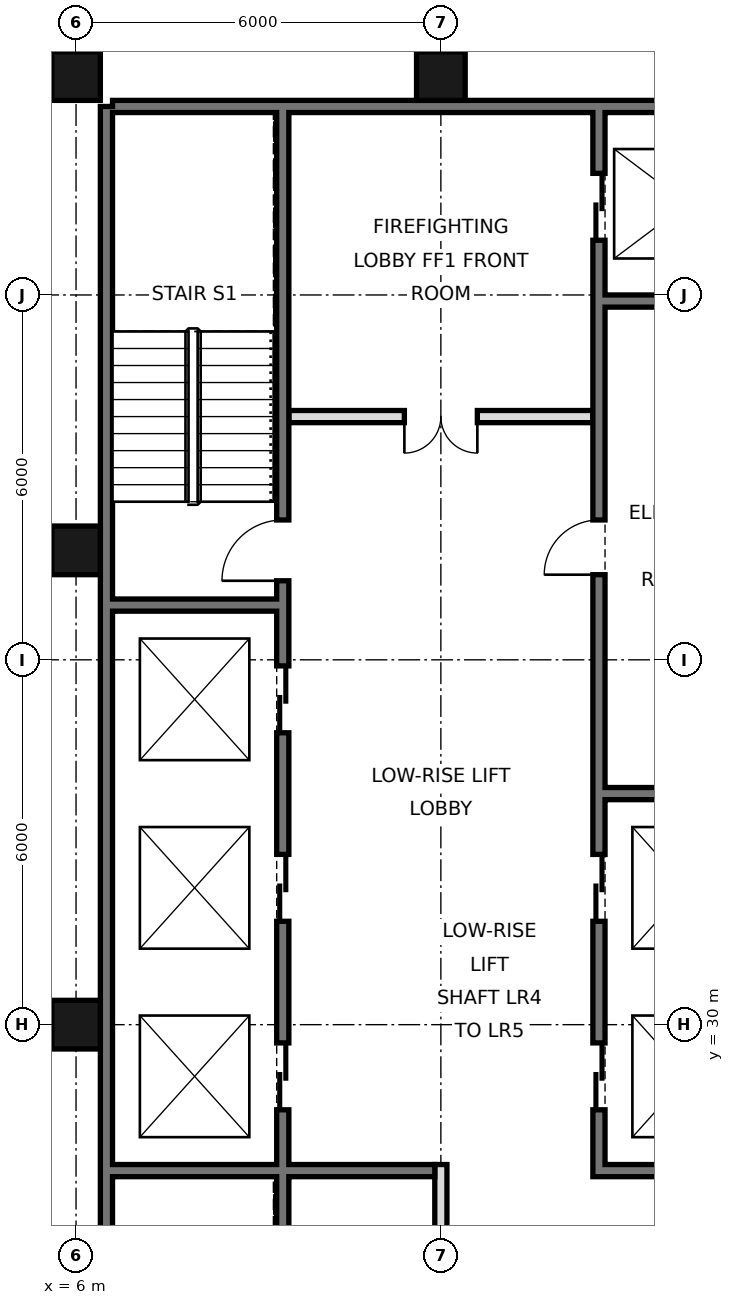
"""IFC4 building model, lengths in metres.
Left out: names, types, materials, properties, quantities, classifications, styles, units other than length and angle.
Written with IfcOpenShell. Run it as: python <this file> out.ifc"""

import sys

from ifc_helpers import new_model, si_unit, direction, frame, frame_2d, origin, origin_2d, place, context, subcontext, project, spatial, rectangle, hollow_rectangle, extrude, element, fill, save


model = new_model("IFC4")
c1 = context("Model", 3, precision=1e-05, world=origin(), true_north=direction((0.0, 1.0)))
c2 = subcontext(c1, "Body", "Model", "MODEL_VIEW")
j1 = project(units=[si_unit("LENGTHUNIT", "METRE"), si_unit("PLANEANGLEUNIT", "RADIAN")], contexts=[c1])
p1 = place(None, origin())
s1 = spatial("IfcSite", under=j1, at=p1, CompositionType="ELEMENT")
p2 = place(p1, origin())
s2 = spatial("IfcBuilding", under=s1, at=p2, CompositionType="ELEMENT")
p3 = place(p2, frame((0.0, 0.0, 67.8)))
s3 = spatial("IfcBuildingStorey", under=s2, at=p3, CompositionType="ELEMENT", Elevation=67.8)
for number, where, z_axis, x_axis in (
    (1, (6.0, 30.0, 0.0), (0.0, 0.0, 1.0), (1.0, 0.0, 0.0)),
    (2, (6.0, 37.8, 0.0), (0.0, 0.0, 1.0), (1.0, 0.0, 0.0)),
    (3, (6.0, 45.6, 0.0), (0.0, 0.0, 1.0), (1.0, 0.0, 0.0)),
    (4, (12.0, 45.6, 0.0), (0.0, 0.0, 1.0), (1.0, 0.0, 0.0)),
):
    element("IfcColumn", number, at=place(p3, frame(where, z_axis=z_axis, x_axis=x_axis)), inside=s3, PredefinedType="COLUMN", context=c2, shape_type="SweptSolid", body=[
        extrude(hollow_rectangle(XDim=0.8, YDim=0.8, WallThickness=0.06, at=origin_2d()), origin(), (0.0, 0.0, 1.0), 3.6),
    ])
p4 = place(p3, frame((6.5, 21.6, 0.0), z_axis=(0.0, 0.0, 1.0), x_axis=(0.0, 1.0, 0.0)))
e5 = element("IfcWall", 5, at=p4, inside=s3, PredefinedType="SOLIDWALL", context=c2, shape_type="SweptSolid", body=[
    extrude(rectangle(XDim=23.5, YDim=0.2, at=frame_2d((11.75, 0.0))), origin(), (0.0, 0.0, 1.0), 3.42),
])
p5 = place(p3, frame((6.6, 45.1, 0.0), z_axis=(0.0, 0.0, 1.0), x_axis=(1.0, 0.0, 0.0)))
e6 = element("IfcWall", 6, at=p5, inside=s3, PredefinedType="SOLIDWALL", context=c2, shape_type="SweptSolid", body=[
    extrude(rectangle(XDim=34.8, YDim=0.2, at=frame_2d((17.4, 0.0))), origin(), (0.0, 0.0, 1.0), 3.42),
])
p6 = place(p3, frame((12.0, 21.6, 0.0), z_axis=(0.0, 0.0, 1.0), x_axis=(0.0, 1.0, 0.0)))
e7 = element("IfcWall", 7, at=p6, inside=s3, PredefinedType="PARTITIONING", context=c2, shape_type="SweptSolid", body=[
    extrude(rectangle(XDim=6.1, YDim=0.2, at=frame_2d((3.05, 0.0))), origin(), (0.0, 0.0, 1.0), 3.42),
])
p7 = place(p3, frame((14.6, 27.5, 0.0), z_axis=(0.0, 0.0, 1.0), x_axis=(0.0, 1.0, 0.0)))
e8 = element("IfcWall", 8, at=p7, inside=s3, PredefinedType="SOLIDWALL", context=c2, shape_type="SweptSolid", body=[
    extrude(rectangle(XDim=17.5, YDim=0.2, at=frame_2d((8.75, 0.0))), origin(), (0.0, 0.0, 1.0), 3.42),
])
p8 = place(p7, frame((1.1, 0.0, 0.0)))
e9 = element("IfcOpeningElement", 9, at=p8, cuts=e8, PredefinedType="OPENING", context=c2, shape_type="SweptSolid", body=[
    extrude(rectangle(XDim=1.1, YDim=2.1, at=frame_2d((0.55, 1.05))), frame((0.0, 0.11, 0.0), z_axis=(0.0, -1.0, 0.0), x_axis=(1.0, 0.0, 0.0)), (0.0, 0.0, 1.0), 0.22),
])
p9 = place(p7, frame((4.2, 0.0, 0.0)))
e10 = element("IfcOpeningElement", 10, at=p9, cuts=e8, PredefinedType="OPENING", context=c2, shape_type="SweptSolid", body=[
    extrude(rectangle(XDim=1.1, YDim=2.1, at=frame_2d((0.55, 1.05))), frame((0.0, 0.11, 0.0), z_axis=(0.0, -1.0, 0.0), x_axis=(1.0, 0.0, 0.0)), (0.0, 0.0, 1.0), 0.22),
])
p10 = place(p7, frame((15.4, 0.0, 0.0)))
e11 = element("IfcOpeningElement", 11, at=p10, cuts=e8, PredefinedType="OPENING", context=c2, shape_type="SweptSolid", body=[
    extrude(rectangle(XDim=1.1, YDim=2.1, at=frame_2d((0.55, 1.05))), frame((0.0, 0.11, 0.0), z_axis=(0.0, -1.0, 0.0), x_axis=(1.0, 0.0, 0.0)), (0.0, 0.0, 1.0), 0.22),
])
p11 = place(p7, frame((9.9, 0.0, 0.0)))
e12 = element("IfcOpeningElement", 12, at=p11, cuts=e8, PredefinedType="OPENING", context=c2, shape_type="SweptSolid", body=[
    extrude(rectangle(XDim=0.9, YDim=2.1, at=frame_2d((0.45, 1.05))), frame((0.0, 0.11, 0.0), z_axis=(0.0, -1.0, 0.0), x_axis=(1.0, 0.0, 0.0)), (0.0, 0.0, 1.0), 0.22),
])
p12 = place(p3, frame((9.4, 21.6, 0.0), z_axis=(0.0, 0.0, 1.0), x_axis=(0.0, 1.0, 0.0)))
e13 = element("IfcWall", 13, at=p12, inside=s3, PredefinedType="SOLIDWALL", context=c2, shape_type="SweptSolid", body=[
    extrude(rectangle(XDim=23.4, YDim=0.2, at=frame_2d((11.7, 0.0))), origin(), (0.0, 0.0, 1.0), 3.42),
])
p13 = place(p12, frame((7.0, 0.0, 0.0)))
e14 = element("IfcOpeningElement", 14, at=p13, cuts=e13, PredefinedType="OPENING", context=c2, shape_type="SweptSolid", body=[
    extrude(rectangle(XDim=1.1, YDim=2.1, at=frame_2d((0.55, 1.05))), frame((0.0, 0.11, 0.0), z_axis=(0.0, -1.0, 0.0), x_axis=(1.0, 0.0, 0.0)), (0.0, 0.0, 1.0), 0.22),
])
p14 = place(p12, frame((10.1, 0.0, 0.0)))
e15 = element("IfcOpeningElement", 15, at=p14, cuts=e13, PredefinedType="OPENING", context=c2, shape_type="SweptSolid", body=[
    extrude(rectangle(XDim=1.1, YDim=2.1, at=frame_2d((0.55, 1.05))), frame((0.0, 0.11, 0.0), z_axis=(0.0, -1.0, 0.0), x_axis=(1.0, 0.0, 0.0)), (0.0, 0.0, 1.0), 0.22),
])
p15 = place(p12, frame((13.2, 0.0, 0.0)))
e16 = element("IfcOpeningElement", 16, at=p15, cuts=e13, PredefinedType="OPENING", context=c2, shape_type="SweptSolid", body=[
    extrude(rectangle(XDim=1.1, YDim=2.1, at=frame_2d((0.55, 1.05))), frame((0.0, 0.11, 0.0), z_axis=(0.0, -1.0, 0.0), x_axis=(1.0, 0.0, 0.0)), (0.0, 0.0, 1.0), 0.22),
])
p16 = place(p12, frame((15.7, 0.0, 0.0)))
e17 = element("IfcOpeningElement", 17, at=p16, cuts=e13, PredefinedType="OPENING", context=c2, shape_type="SweptSolid", body=[
    extrude(rectangle(XDim=1.0, YDim=2.1, at=frame_2d((0.5, 1.05))), frame((0.0, 0.11, 0.0), z_axis=(0.0, -1.0, 0.0), x_axis=(1.0, 0.0, 0.0)), (0.0, 0.0, 1.0), 0.22),
])
p17 = place(p12, frame((0.175, 0.0, 0.0)))
e18 = element("IfcOpeningElement", 18, at=p17, cuts=e13, PredefinedType="OPENING", context=c2, shape_type="SweptSolid", body=[
    extrude(rectangle(XDim=0.9, YDim=2.1, at=frame_2d((0.45, 1.05))), frame((0.0, 0.11, 0.0), z_axis=(0.0, -1.0, 0.0), x_axis=(1.0, 0.0, 0.0)), (0.0, 0.0, 1.0), 0.22),
])
p18 = place(p3, frame((14.7, 27.6, 0.0), z_axis=(0.0, 0.0, 1.0), x_axis=(1.0, 0.0, 0.0)))
e19 = element("IfcWall", 19, at=p18, inside=s3, PredefinedType="SOLIDWALL", context=c2, shape_type="SweptSolid", body=[
    extrude(rectangle(XDim=2.7, YDim=0.2, at=frame_2d((1.35, 0.0))), origin(), (0.0, 0.0, 1.0), 3.42),
])
p19 = place(p3, frame((6.6, 27.6, 0.0), z_axis=(0.0, 0.0, 1.0), x_axis=(1.0, 0.0, 0.0)))
e20 = element("IfcWall", 20, at=p19, inside=s3, PredefinedType="SOLIDWALL", context=c2, shape_type="SweptSolid", body=[
    extrude(rectangle(XDim=5.3, YDim=0.2, at=frame_2d((2.65, 0.0))), origin(), (0.0, 0.0, 1.0), 3.42),
])
for number, where, z_axis, x_axis in (
    (21, (14.7, 33.8, 0.0), (0.0, 0.0, 1.0), (1.0, 0.0, 0.0)),
    (22, (6.6, 36.9, 0.0), (0.0, 0.0, 1.0), (1.0, 0.0, 0.0)),
):
    element("IfcWall", number, at=place(p3, frame(where, z_axis=z_axis, x_axis=x_axis)), inside=s3, PredefinedType="SOLIDWALL", context=c2, shape_type="SweptSolid", body=[
        extrude(rectangle(XDim=2.7, YDim=0.2, at=frame_2d((1.35, 0.0))), origin(), (0.0, 0.0, 1.0), 3.42),
    ])
p20 = place(p3, frame((9.5, 40.0, 0.0), z_axis=(0.0, 0.0, 1.0), x_axis=(1.0, 0.0, 0.0)))
e23 = element("IfcWall", 23, at=p20, inside=s3, PredefinedType="PARTITIONING", context=c2, shape_type="SweptSolid", body=[
    extrude(rectangle(XDim=5.0, YDim=0.2, at=frame_2d((2.5, 0.0))), origin(), (0.0, 0.0, 1.0), 3.42),
])
p21 = place(p20, frame((1.9, 0.0, 0.0)))
e24 = element("IfcOpeningElement", 24, at=p21, cuts=e23, PredefinedType="OPENING", context=c2, shape_type="SweptSolid", body=[
    extrude(rectangle(XDim=1.2, YDim=2.1, at=frame_2d((0.6, 1.05))), frame((0.0, 0.11, 0.0), z_axis=(0.0, -1.0, 0.0), x_axis=(1.0, 0.0, 0.0)), (0.0, 0.0, 1.0), 0.22),
])
p22 = place(p3, frame((14.7, 41.9, 0.0), z_axis=(0.0, 0.0, 1.0), x_axis=(1.0, 0.0, 0.0)))
e25 = element("IfcWall", 25, at=p22, inside=s3, PredefinedType="SOLIDWALL", context=c2, shape_type="SweptSolid", body=[
    extrude(rectangle(XDim=2.7, YDim=0.2, at=frame_2d((1.35, 0.0))), origin(), (0.0, 0.0, 1.0), 3.42),
])
p23 = place(p21, frame((1.2, 0.0, 0.0), z_axis=(0.0, 0.0, 1.0), x_axis=(-1.0, 0.0, 0.0)))
e26 = element("IfcDoor", 26, at=p23, inside=s3, OperationType="DOUBLE_DOOR_SINGLE_SWING", PredefinedType="DOOR", context=c2, shape_type="SweptSolid", body=[
    extrude(rectangle(XDim=1.2, YDim=2.1, at=frame_2d((0.6, 1.05))), frame((0.0, 0.025, 0.0), z_axis=(0.0, -1.0, 0.0), x_axis=(1.0, 0.0, 0.0)), (0.0, 0.0, 1.0), 0.05),
])
fill(e24, e26)
p24 = place(p8, origin())
e27 = element("IfcDoor", 27, at=p24, inside=s3, OperationType="DOUBLE_DOOR_SLIDING", PredefinedType="DOOR", context=c2, shape_type="SweptSolid", body=[
    extrude(rectangle(XDim=1.1, YDim=2.1, at=frame_2d((0.55, 1.05))), frame((0.0, 0.025, 0.0), z_axis=(0.0, -1.0, 0.0), x_axis=(1.0, 0.0, 0.0)), (0.0, 0.0, 1.0), 0.05),
])
fill(e9, e27)
p25 = place(p9, origin())
e28 = element("IfcDoor", 28, at=p25, inside=s3, OperationType="DOUBLE_DOOR_SLIDING", PredefinedType="DOOR", context=c2, shape_type="SweptSolid", body=[
    extrude(rectangle(XDim=1.1, YDim=2.1, at=frame_2d((0.55, 1.05))), frame((0.0, 0.025, 0.0), z_axis=(0.0, -1.0, 0.0), x_axis=(1.0, 0.0, 0.0)), (0.0, 0.0, 1.0), 0.05),
])
fill(e10, e28)
p26 = place(p10, origin())
e29 = element("IfcDoor", 29, at=p26, inside=s3, OperationType="DOUBLE_DOOR_SLIDING", PredefinedType="DOOR", context=c2, shape_type="SweptSolid", body=[
    extrude(rectangle(XDim=1.1, YDim=2.1, at=frame_2d((0.55, 1.05))), frame((0.0, 0.025, 0.0), z_axis=(0.0, -1.0, 0.0), x_axis=(1.0, 0.0, 0.0)), (0.0, 0.0, 1.0), 0.05),
])
fill(e11, e29)
p27 = place(p13, origin())
e30 = element("IfcDoor", 30, at=p27, inside=s3, OperationType="DOUBLE_DOOR_SLIDING", PredefinedType="DOOR", context=c2, shape_type="SweptSolid", body=[
    extrude(rectangle(XDim=1.1, YDim=2.1, at=frame_2d((0.55, 1.05))), frame((0.0, 0.025, 0.0), z_axis=(0.0, -1.0, 0.0), x_axis=(1.0, 0.0, 0.0)), (0.0, 0.0, 1.0), 0.05),
])
fill(e14, e30)
p28 = place(p14, origin())
e31 = element("IfcDoor", 31, at=p28, inside=s3, OperationType="DOUBLE_DOOR_SLIDING", PredefinedType="DOOR", context=c2, shape_type="SweptSolid", body=[
    extrude(rectangle(XDim=1.1, YDim=2.1, at=frame_2d((0.55, 1.05))), frame((0.0, 0.025, 0.0), z_axis=(0.0, -1.0, 0.0), x_axis=(1.0, 0.0, 0.0)), (0.0, 0.0, 1.0), 0.05),
])
fill(e15, e31)
p29 = place(p15, origin())
e32 = element("IfcDoor", 32, at=p29, inside=s3, OperationType="DOUBLE_DOOR_SLIDING", PredefinedType="DOOR", context=c2, shape_type="SweptSolid", body=[
    extrude(rectangle(XDim=1.1, YDim=2.1, at=frame_2d((0.55, 1.05))), frame((0.0, 0.025, 0.0), z_axis=(0.0, -1.0, 0.0), x_axis=(1.0, 0.0, 0.0)), (0.0, 0.0, 1.0), 0.05),
])
fill(e16, e32)
p30 = place(p16, origin())
e33 = element("IfcDoor", 33, at=p30, inside=s3, OperationType="SINGLE_SWING_LEFT", PredefinedType="DOOR", context=c2, shape_type="SweptSolid", body=[
    extrude(rectangle(XDim=1.0, YDim=2.1, at=frame_2d((0.5, 1.05))), frame((0.0, 0.025, 0.0), z_axis=(0.0, -1.0, 0.0), x_axis=(1.0, 0.0, 0.0)), (0.0, 0.0, 1.0), 0.05),
])
fill(e17, e33)
p31 = place(p11, origin())
e34 = element("IfcDoor", 34, at=p31, inside=s3, OperationType="SINGLE_SWING_LEFT", PredefinedType="DOOR", context=c2, shape_type="SweptSolid", body=[
    extrude(rectangle(XDim=0.9, YDim=2.1, at=frame_2d((0.45, 1.05))), frame((0.0, 0.025, 0.0), z_axis=(0.0, -1.0, 0.0), x_axis=(1.0, 0.0, 0.0)), (0.0, 0.0, 1.0), 0.05),
])
fill(e12, e34)
save(model, sys.argv[1])
